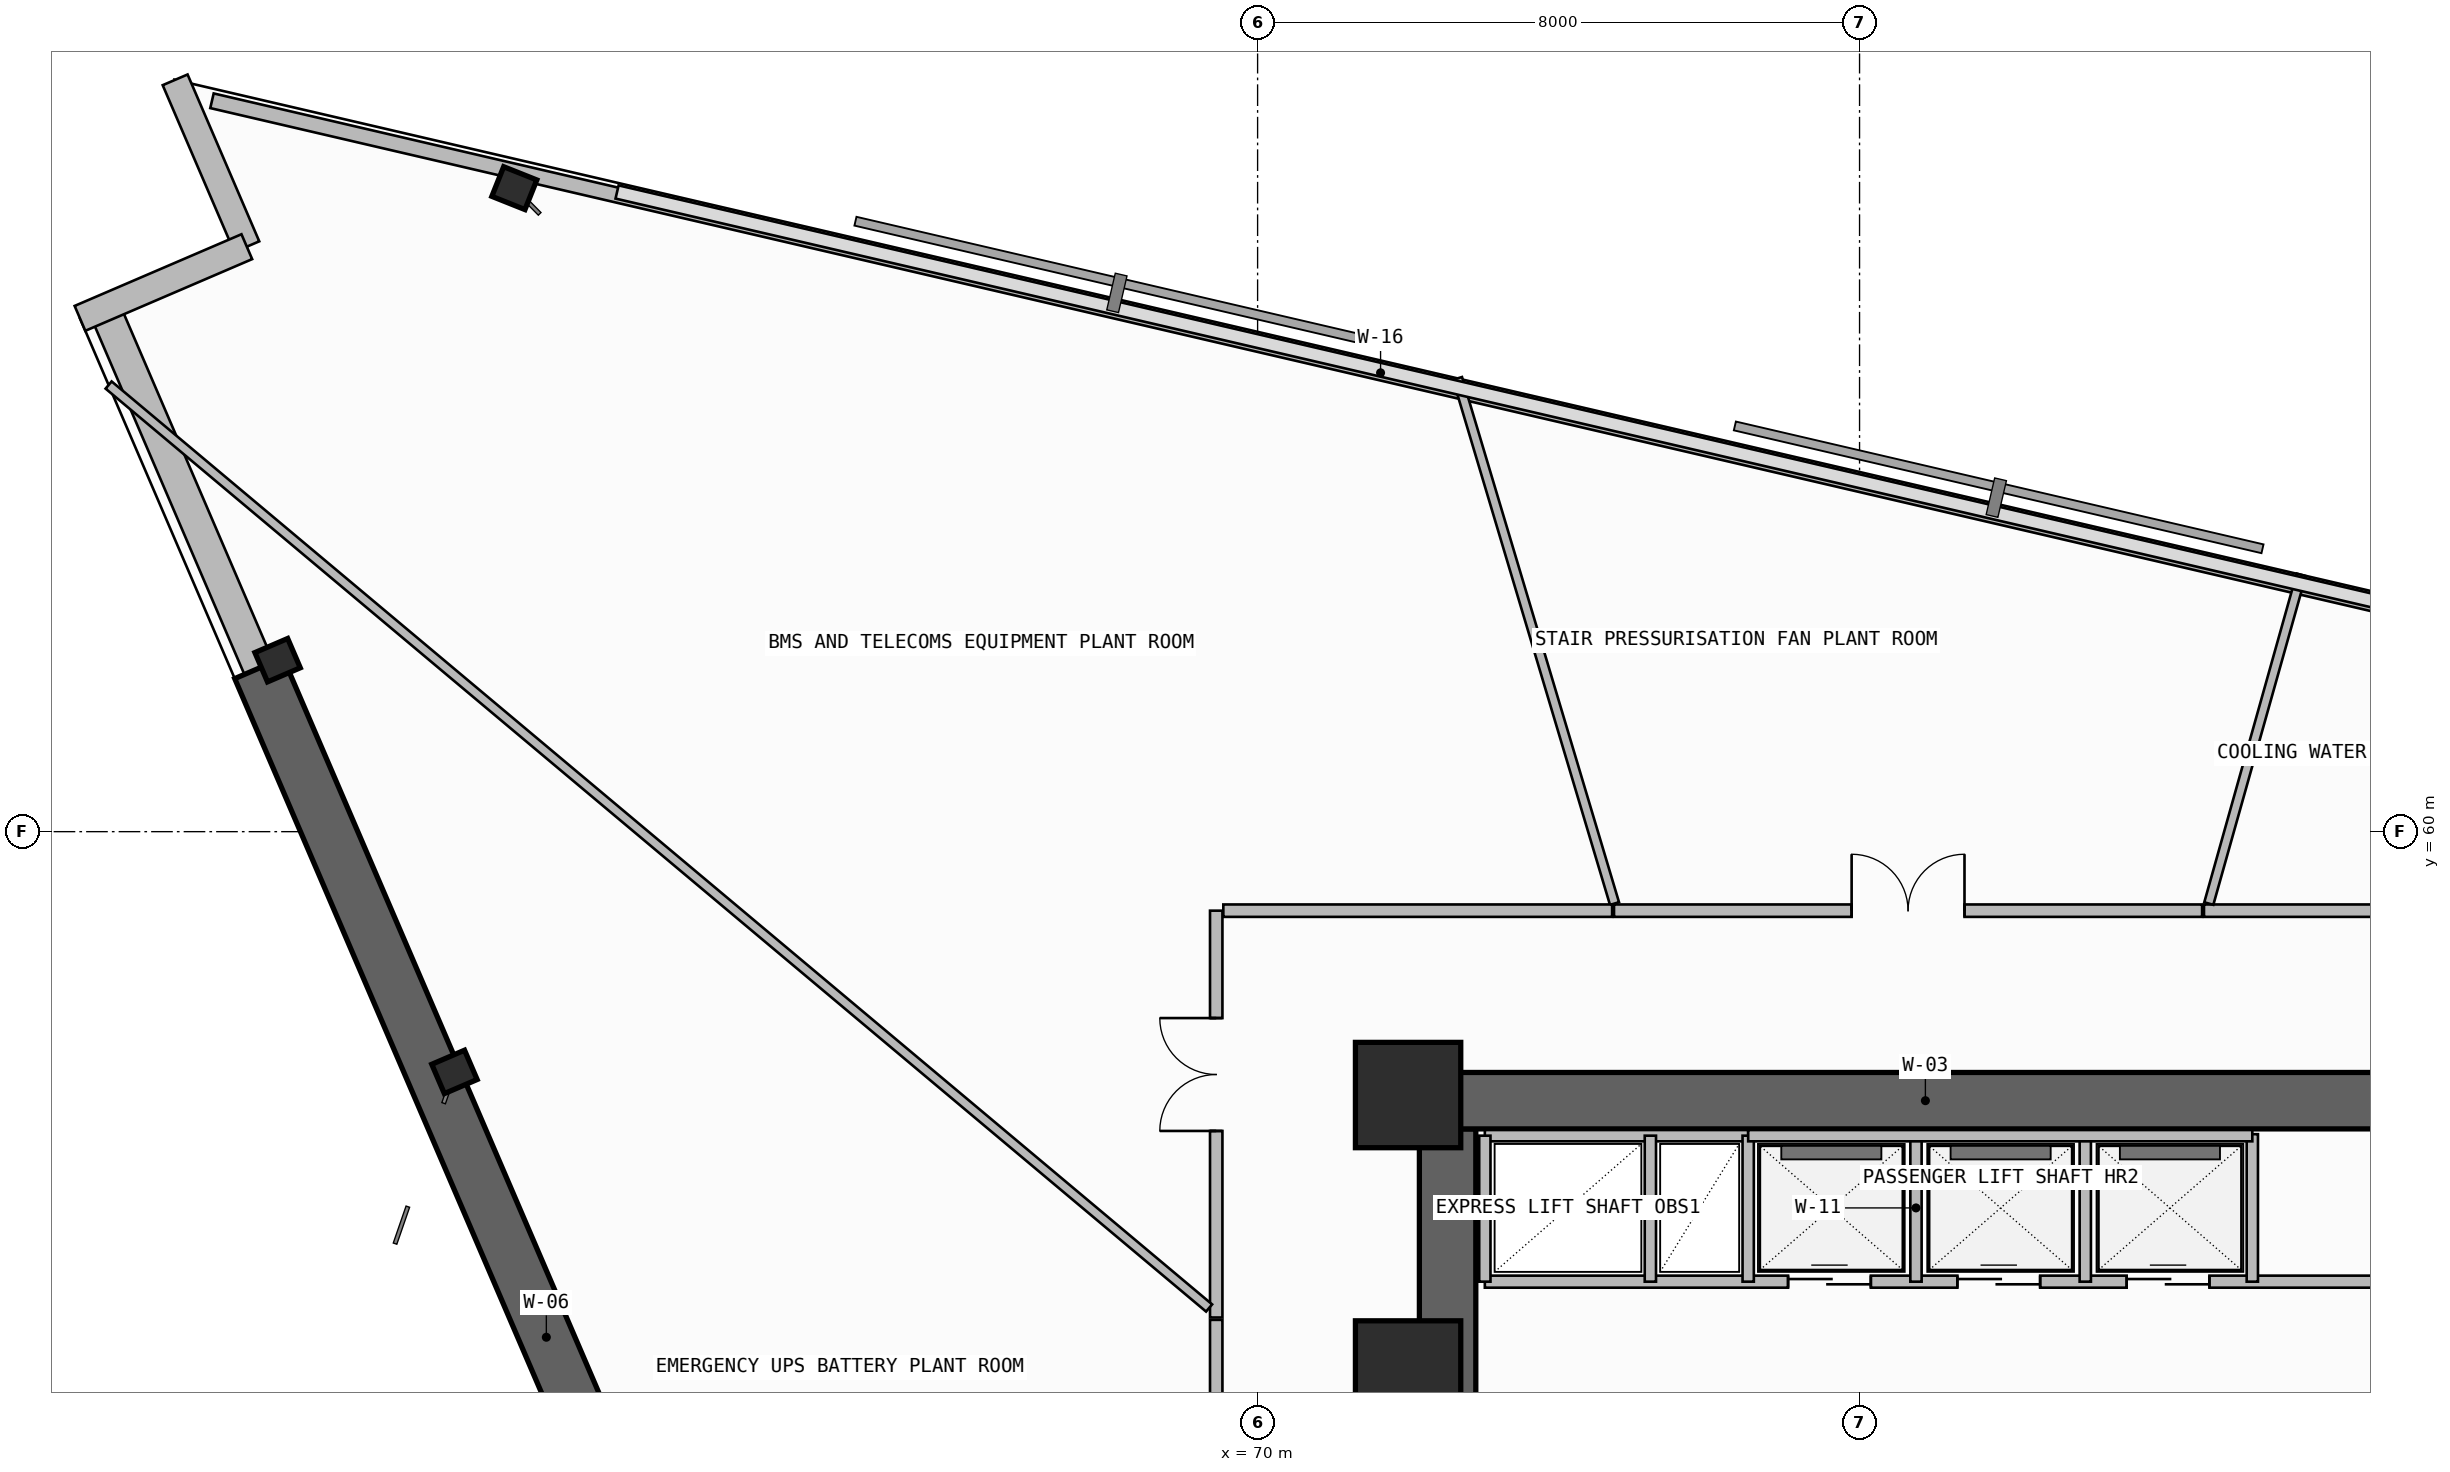
"""IFC4 building model, lengths in metres.
Left out: names, types, materials, properties, quantities, classifications, styles, units other than length and angle.
Written with IfcOpenShell. Run it as: python <this file> out.ifc"""

import sys

from ifc_helpers import new_model, si_unit, direction, frame, frame_2d, origin, origin_2d, place, context, subcontext, project, spatial, rectangle, i_section, extrude, element, fill, save


model = new_model("IFC4")
c1 = context("Model", 3, precision=1e-05, world=origin(), true_north=direction((0.0, 1.0)))
c2 = subcontext(c1, "Body", "Model", "MODEL_VIEW")
j1 = project(units=[si_unit("LENGTHUNIT", "METRE"), si_unit("PLANEANGLEUNIT", "RADIAN")], contexts=[c1])
p1 = place(None, origin())
s1 = spatial("IfcSite", under=j1, at=p1, CompositionType="ELEMENT")
p2 = place(p1, origin())
s2 = spatial("IfcBuilding", under=s1, at=p2, CompositionType="ELEMENT")
p3 = place(p2, frame((0.0, 0.0, 196.7)))
s3 = spatial("IfcBuildingStorey", under=s2, at=p3, CompositionType="ELEMENT", Elevation=196.7)
p4 = place(p3, frame((72.525, 43.35, -0.5), z_axis=(0.0, 0.0, 1.0), x_axis=(0.0, 1.0, 0.0)))
e1 = element("IfcWall", 1, at=p4, inside=s3, PredefinedType="SHEAR", context=c2, shape_type="SweptSolid", body=[
    extrude(rectangle(XDim=12.7, YDim=0.75, at=frame_2d((6.35, 0.0))), origin(), (0.0, 0.0, 1.0), 4.3),
])
p5 = place(p4, frame((1.35, 0.0, 0.5)))
e2 = element("IfcOpeningElement", 2, at=p5, cuts=e1, PredefinedType="OPENING", context=c2, shape_type="SweptSolid", body=[
    extrude(rectangle(XDim=1.2, YDim=2.2, at=frame_2d((0.6, 1.1))), frame((0.0, 0.385, 0.0), z_axis=(0.0, -1.0, 0.0), x_axis=(1.0, 0.0, 0.0)), (0.0, 0.0, 1.0), 0.77),
])
p6 = place(p3, frame((72.0, 56.425, -0.5), z_axis=(0.0, 0.0, 1.0), x_axis=(1.0, 0.0, 0.0)))
e3 = element("IfcWall", 3, at=p6, inside=s3, PredefinedType="SHEAR", context=c2, shape_type="SweptSolid", body=[
    extrude(rectangle(XDim=13.75, YDim=0.75, at=frame_2d((6.875, 0.0))), origin(), (0.0, 0.0, 1.0), 4.3),
])
for number, where, z_axis, x_axis in (
    (4, (72.0, 52.8, 0.0), (0.0, 0.0, 1.0), (1.0, 0.0, 0.0)),
    (5, (72.0, 56.5, 0.0), (0.0, 0.0, 1.0), (1.0, 0.0, 0.0)),
):
    element("IfcColumn", number, at=place(p3, frame(where, z_axis=z_axis, x_axis=x_axis)), inside=s3, PredefinedType="COLUMN", context=c2, shape_type="SweptSolid", body=[
        extrude(rectangle(XDim=1.4, YDim=1.4, at=origin_2d()), origin(), (0.0, 0.0, 1.0), 4.2),
    ])
for number, where, z_axis, x_axis in (
    (6, (60.122, 68.551, 0.0), (0.0, 0.0, 1.0), (0.371, 0.929, 0.0)),
    (7, (56.976, 62.279, 0.0), (0.0, 0.0, 1.0), (-0.395, 0.919, 0.0)),
    (8, (59.326, 56.807, 0.0), (0.0, 0.0, 1.0), (-0.395, 0.919, 0.0)),
):
    element("IfcColumn", number, at=place(p3, frame(where, z_axis=z_axis, x_axis=x_axis)), inside=s3, PredefinedType="COLUMN", context=c2, shape_type="SweptSolid", body=[
        extrude(i_section(OverallWidth=0.424, OverallDepth=0.474, WebThickness=0.048, FlangeThickness=0.077, FilletRadius=0.015, at=origin_2d()), origin(), (0.0, 0.0, 1.0), 4.2),
    ])
p7 = place(p3, frame((54.671, 66.959, 0.0), z_axis=(0.0, 0.0, 1.0), x_axis=(0.394733507229, -0.918795656428, 0.0)))
e9 = element("IfcWall", 9, at=p7, inside=s3, PredefinedType="SOLIDWALL", context=c2, shape_type="SweptSolid", body=[
    extrude(rectangle(XDim=5.21, YDim=0.42, at=frame_2d((2.605, 0.0))), origin(), (0.0, 0.0, 1.0), 2.777),
])
p8 = place(p3, frame((56.728, 62.172, -0.5), z_axis=(0.0, 0.0, 1.0), x_axis=(0.394736752992, -0.918794261974, 0.0)))
e10 = element("IfcWall", 10, at=p8, inside=s3, PredefinedType="SHEAR", context=c2, shape_type="SweptSolid", body=[
    extrude(rectangle(XDim=19.353, YDim=0.7, at=frame_2d((9.676, 0.0))), origin(), (0.0, 0.0, 1.0), 4.3),
])
p9 = place(p3, frame((55.614, 69.991, 0.0), z_axis=(0.0, 0.0, 1.0), x_axis=(0.394663989422, -0.918825519592, 0.0)))
e11 = element("IfcWall", 11, at=p9, inside=s3, PredefinedType="SOLIDWALL", context=c2, shape_type="SweptSolid", body=[
    extrude(rectangle(XDim=2.413, YDim=0.36, at=frame_2d((1.207, 0.0))), origin(), (0.0, 0.0, 1.0), 3.8),
])
p10 = place(p3, frame((56.566, 67.773, 0.0), z_axis=(0.0, 0.0, 1.0), x_axis=(-0.918788830096, -0.394749396062, 0.0)))
e12 = element("IfcWall", 12, at=p10, inside=s3, PredefinedType="SOLIDWALL", context=c2, shape_type="SweptSolid", body=[
    extrude(rectangle(XDim=2.413, YDim=0.36, at=frame_2d((1.207, 0.0))), origin(), (0.0, 0.0, 1.0), 3.8),
])
p11 = place(p3, frame((87.165, 62.482, 0.0), z_axis=(0.0, 0.0, 1.0), x_axis=(-0.973958867717, 0.226724775876, 0.0)))
e13 = element("IfcWall", 13, at=p11, inside=s3, PredefinedType="PARAPET", context=c2, shape_type="SweptSolid", body=[
    extrude(rectangle(XDim=31.892, YDim=0.2, at=frame_2d((15.946, 0.0))), origin(), (0.0, 0.0, 1.0), 1.15),
])
p12 = place(p3, frame((73.02, 54.02, 0.0), z_axis=(0.0, 0.0, 1.0), x_axis=(1.0, 0.0, 0.0)))
e14 = element("IfcWall", 14, at=p12, inside=s3, PredefinedType="SOLIDWALL", context=c2, shape_type="SweptSolid", body=[
    extrude(rectangle(XDim=12.08, YDim=0.16, at=frame_2d((6.04, 0.0))), origin(), (0.0, 0.0, 1.0), 3.8),
])
p13 = place(p12, frame((4.03, 0.0, 0.0)))
e15 = element("IfcOpeningElement", 15, at=p13, cuts=e14, PredefinedType="OPENING", context=c2, shape_type="SweptSolid", body=[
    extrude(rectangle(XDim=1.1, YDim=2.25, at=frame_2d((0.55, 1.125))), frame((0.0, 0.09, 0.0), z_axis=(0.0, -1.0, 0.0), x_axis=(1.0, 0.0, 0.0)), (0.0, 0.0, 1.0), 0.18),
])
p14 = place(p12, frame((6.28, 0.0, 0.0)))
e16 = element("IfcOpeningElement", 16, at=p14, cuts=e14, PredefinedType="OPENING", context=c2, shape_type="SweptSolid", body=[
    extrude(rectangle(XDim=1.1, YDim=2.25, at=frame_2d((0.55, 1.125))), frame((0.0, 0.09, 0.0), z_axis=(0.0, -1.0, 0.0), x_axis=(1.0, 0.0, 0.0)), (0.0, 0.0, 1.0), 0.18),
])
p15 = place(p12, frame((8.53, 0.0, 0.0)))
e17 = element("IfcOpeningElement", 17, at=p15, cuts=e14, PredefinedType="OPENING", context=c2, shape_type="SweptSolid", body=[
    extrude(rectangle(XDim=1.1, YDim=2.25, at=frame_2d((0.55, 1.125))), frame((0.0, 0.09, 0.0), z_axis=(0.0, -1.0, 0.0), x_axis=(1.0, 0.0, 0.0)), (0.0, 0.0, 1.0), 0.18),
])
p16 = place(p3, frame((73.02, 55.96, 0.0), z_axis=(0.0, 0.0, 1.0), x_axis=(1.0, 0.0, 0.0)))
e18 = element("IfcWall", 18, at=p16, inside=s3, PredefinedType="SOLIDWALL", context=c2, shape_type="SweptSolid", body=[
    extrude(rectangle(XDim=3.5, YDim=0.15, at=frame_2d((1.75, 0.0))), origin(), (0.0, 0.0, 1.0), 3.8),
])
p17 = place(p3, frame((73.02, 54.02, 0.0), z_axis=(0.0, 0.0, 1.0), x_axis=(0.0, 1.0, 0.0)))
e19 = element("IfcWall", 19, at=p17, inside=s3, PredefinedType="PLUMBINGWALL", context=c2, shape_type="SweptSolid", body=[
    extrude(rectangle(XDim=1.94, YDim=0.15, at=frame_2d((0.97, 0.0))), origin(), (0.0, 0.0, 1.0), 3.8),
])
p18 = place(p3, frame((76.52, 54.02, 0.0), z_axis=(0.0, 0.0, 1.0), x_axis=(0.0, 1.0, 0.0)))
e20 = element("IfcWall", 20, at=p18, inside=s3, PredefinedType="SOLIDWALL", context=c2, shape_type="SweptSolid", body=[
    extrude(rectangle(XDim=1.94, YDim=0.15, at=frame_2d((0.97, 0.0))), origin(), (0.0, 0.0, 1.0), 3.8),
])
p19 = place(p3, frame((75.22, 54.02, 0.0), z_axis=(0.0, 0.0, 1.0), x_axis=(0.0, 1.0, 0.0)))
e21 = element("IfcWall", 21, at=p19, inside=s3, PredefinedType="PLUMBINGWALL", context=c2, shape_type="SweptSolid", body=[
    extrude(rectangle(XDim=1.94, YDim=0.15, at=frame_2d((0.97, 0.0))), origin(), (0.0, 0.0, 1.0), 3.8),
])
for number, where, z_axis, x_axis in (
    (22, (78.75, 54.02, 0.0), (0.0, 0.0, 1.0), (0.0, 1.0, 0.0)),
    (23, (81.0, 54.02, 0.0), (0.0, 0.0, 1.0), (0.0, 1.0, 0.0)),
):
    element("IfcWall", number, at=place(p3, frame(where, z_axis=z_axis, x_axis=x_axis)), inside=s3, PredefinedType="PLUMBINGWALL", context=c2, shape_type="SweptSolid", body=[
        extrude(rectangle(XDim=1.96, YDim=0.15, at=frame_2d((0.98, 0.0))), origin(), (0.0, 0.0, 1.0), 3.8),
    ])
p20 = place(p3, frame((83.22, 54.02, 0.0), z_axis=(0.0, 0.0, 1.0), x_axis=(0.0, 1.0, 0.0)))
e24 = element("IfcWall", 24, at=p20, inside=s3, PredefinedType="SOLIDWALL", context=c2, shape_type="SweptSolid", body=[
    extrude(rectangle(XDim=1.96, YDim=0.15, at=frame_2d((0.98, 0.0))), origin(), (0.0, 0.0, 1.0), 3.8),
])
p21 = place(p3, frame((76.52, 55.96, 0.0), z_axis=(0.0, 0.0, 1.0), x_axis=(1.0, 0.0, 0.0)))
e25 = element("IfcWall", 25, at=p21, inside=s3, PredefinedType="SOLIDWALL", context=c2, shape_type="SweptSolid", body=[
    extrude(rectangle(XDim=6.7, YDim=0.15, at=frame_2d((3.35, 0.0))), origin(), (0.0, 0.0, 1.0), 3.8),
])
p22 = place(p3, frame((88.15, 58.95, 0.0), z_axis=(0.0, 0.0, 1.0), x_axis=(-1.0, 0.0, 0.0)))
e26 = element("IfcWall", 26, at=p22, inside=s3, PredefinedType="PARTITIONING", context=c2, shape_type="SweptSolid", body=[
    extrude(rectangle(XDim=5.572, YDim=0.165, at=frame_2d((2.786, 0.0))), origin(), (0.0, 0.0, 1.0), 2.777),
])
p23 = place(p3, frame((82.642, 59.044, 0.0), z_axis=(0.0, 0.0, 1.0), x_axis=(0.270597571844, 0.962692554304, 0.0)))
e27 = element("IfcWall", 27, at=p23, inside=s3, PredefinedType="PARTITIONING", context=c2, shape_type="SweptSolid", body=[
    extrude(rectangle(XDim=4.538, YDim=0.125, at=frame_2d((2.269, 0.0))), origin(), (0.0, 0.0, 1.0), 3.8),
])
p24 = place(p3, frame((82.552, 58.95, 0.0), z_axis=(0.0, 0.0, 1.0), x_axis=(-1.0, 0.0, 0.0)))
e28 = element("IfcWall", 28, at=p24, inside=s3, PredefinedType="PARTITIONING", context=c2, shape_type="SweptSolid", body=[
    extrude(rectangle(XDim=7.816, YDim=0.165, at=frame_2d((3.908, 0.0))), origin(), (0.0, 0.0, 1.0), 3.8),
])
p25 = place(p24, frame((3.158, 0.0, 0.0)))
e29 = element("IfcOpeningElement", 29, at=p25, cuts=e28, PredefinedType="OPENING", context=c2, shape_type="SweptSolid", body=[
    extrude(rectangle(XDim=1.5, YDim=2.25, at=frame_2d((0.75, 1.125))), frame((0.0, 0.093, 0.0), z_axis=(0.0, -1.0, 0.0), x_axis=(1.0, 0.0, 0.0)), (0.0, 0.0, 1.0), 0.185),
])
p26 = place(p3, frame((74.743, 59.044, 0.0), z_axis=(0.0, 0.0, 1.0), x_axis=(-0.286462199458, 0.958091544834, 0.0)))
e30 = element("IfcWall", 30, at=p26, inside=s3, PredefinedType="PARTITIONING", context=c2, shape_type="SweptSolid", body=[
    extrude(rectangle(XDim=7.284, YDim=0.125, at=frame_2d((3.642, 0.0))), origin(), (0.0, 0.0, 1.0), 3.8),
])
p27 = place(p3, frame((69.45, 58.95, 0.0), z_axis=(0.0, 0.0, 1.0), x_axis=(0.0, -1.0, 0.0)))
e31 = element("IfcWall", 31, at=p27, inside=s3, PredefinedType="PARTITIONING", context=c2, shape_type="SweptSolid", body=[
    extrude(rectangle(XDim=5.406, YDim=0.165, at=frame_2d((2.703, 0.0))), origin(), (0.0, 0.0, 1.0), 2.777),
])
p28 = place(p27, frame((1.427, 0.0, 0.0)))
e32 = element("IfcOpeningElement", 32, at=p28, cuts=e31, PredefinedType="OPENING", context=c2, shape_type="SweptSolid", body=[
    extrude(rectangle(XDim=1.5, YDim=2.25, at=frame_2d((0.75, 1.125))), frame((0.0, 0.093, 0.0), z_axis=(0.0, -1.0, 0.0), x_axis=(1.0, 0.0, 0.0)), (0.0, 0.0, 1.0), 0.185),
])
p29 = place(p3, frame((74.712, 58.95, 0.0), z_axis=(0.0, 0.0, 1.0), x_axis=(-1.0, 0.0, 0.0)))
e33 = element("IfcWall", 33, at=p29, inside=s3, PredefinedType="PARTITIONING", context=c2, shape_type="SweptSolid", body=[
    extrude(rectangle(XDim=5.167, YDim=0.165, at=frame_2d((2.583, 0.0))), origin(), (0.0, 0.0, 1.0), 2.777),
])
p30 = place(p3, frame((69.355, 53.67, 0.0), z_axis=(0.0, 0.0, 1.0), x_axis=(-0.766239280677, 0.642555339833, 0.0)))
e34 = element("IfcWall", 34, at=p30, inside=s3, PredefinedType="PARTITIONING", context=c2, shape_type="SweptSolid", body=[
    extrude(rectangle(XDim=19.088, YDim=0.125, at=frame_2d((9.544, 0.0))), origin(), (0.0, 0.0, 1.0), 2.777),
])
p31 = place(p3, frame((69.45, 53.512, 0.0), z_axis=(0.0, 0.0, 1.0), x_axis=(0.0, -1.0, 0.0)))
e35 = element("IfcWall", 35, at=p31, inside=s3, PredefinedType="PARTITIONING", context=c2, shape_type="SweptSolid", body=[
    extrude(rectangle(XDim=6.658, YDim=0.165, at=frame_2d((3.329, 0.0))), origin(), (0.0, 0.0, 1.0), 2.777),
])
p32 = place(p31, frame((2.579, 0.0, 0.0)))
e36 = element("IfcOpeningElement", 36, at=p32, cuts=e35, PredefinedType="OPENING", context=c2, shape_type="SweptSolid", body=[
    extrude(rectangle(XDim=1.5, YDim=2.25, at=frame_2d((0.75, 1.125))), frame((0.0, 0.093, 0.0), z_axis=(0.0, -1.0, 0.0), x_axis=(1.0, 0.0, 0.0)), (0.0, 0.0, 1.0), 0.185),
])
p33 = place(p13, origin())
e37 = element("IfcDoor", 37, at=p33, inside=s3, OperationType="DOUBLE_DOOR_SLIDING", PredefinedType="DOOR", context=c2, shape_type="SweptSolid", body=[
    extrude(rectangle(XDim=1.1, YDim=2.25, at=frame_2d((0.55, 1.125))), frame((0.0, 0.025, 0.0), z_axis=(0.0, -1.0, 0.0), x_axis=(1.0, 0.0, 0.0)), (0.0, 0.0, 1.0), 0.05),
])
fill(e15, e37)
p34 = place(p14, origin())
e38 = element("IfcDoor", 38, at=p34, inside=s3, OperationType="DOUBLE_DOOR_SLIDING", PredefinedType="DOOR", context=c2, shape_type="SweptSolid", body=[
    extrude(rectangle(XDim=1.1, YDim=2.25, at=frame_2d((0.55, 1.125))), frame((0.0, 0.025, 0.0), z_axis=(0.0, -1.0, 0.0), x_axis=(1.0, 0.0, 0.0)), (0.0, 0.0, 1.0), 0.05),
])
fill(e16, e38)
p35 = place(p15, origin())
e39 = element("IfcDoor", 39, at=p35, inside=s3, OperationType="DOUBLE_DOOR_SLIDING", PredefinedType="DOOR", context=c2, shape_type="SweptSolid", body=[
    extrude(rectangle(XDim=1.1, YDim=2.25, at=frame_2d((0.55, 1.125))), frame((0.0, 0.025, 0.0), z_axis=(0.0, -1.0, 0.0), x_axis=(1.0, 0.0, 0.0)), (0.0, 0.0, 1.0), 0.05),
])
fill(e17, e39)
p36 = place(p25, frame((1.5, 0.0, 0.0), z_axis=(0.0, 0.0, 1.0), x_axis=(-1.0, 0.0, 0.0)))
e40 = element("IfcDoor", 40, at=p36, inside=s3, OperationType="DOUBLE_DOOR_SINGLE_SWING", PredefinedType="DOOR", context=c2, shape_type="SweptSolid", body=[
    extrude(rectangle(XDim=1.5, YDim=2.25, at=frame_2d((0.75, 1.125))), frame((0.0, 0.025, 0.0), z_axis=(0.0, -1.0, 0.0), x_axis=(1.0, 0.0, 0.0)), (0.0, 0.0, 1.0), 0.05),
])
fill(e29, e40)
p37 = place(p28, frame((1.5, 0.0, 0.0), z_axis=(0.0, 0.0, 1.0), x_axis=(-1.0, 0.0, 0.0)))
e41 = element("IfcDoor", 41, at=p37, inside=s3, OperationType="DOUBLE_DOOR_SINGLE_SWING", PredefinedType="DOOR", context=c2, shape_type="SweptSolid", body=[
    extrude(rectangle(XDim=1.5, YDim=2.25, at=frame_2d((0.75, 1.125))), frame((0.0, 0.025, 0.0), z_axis=(0.0, -1.0, 0.0), x_axis=(1.0, 0.0, 0.0)), (0.0, 0.0, 1.0), 0.05),
])
fill(e32, e41)
save(model, sys.argv[1])
